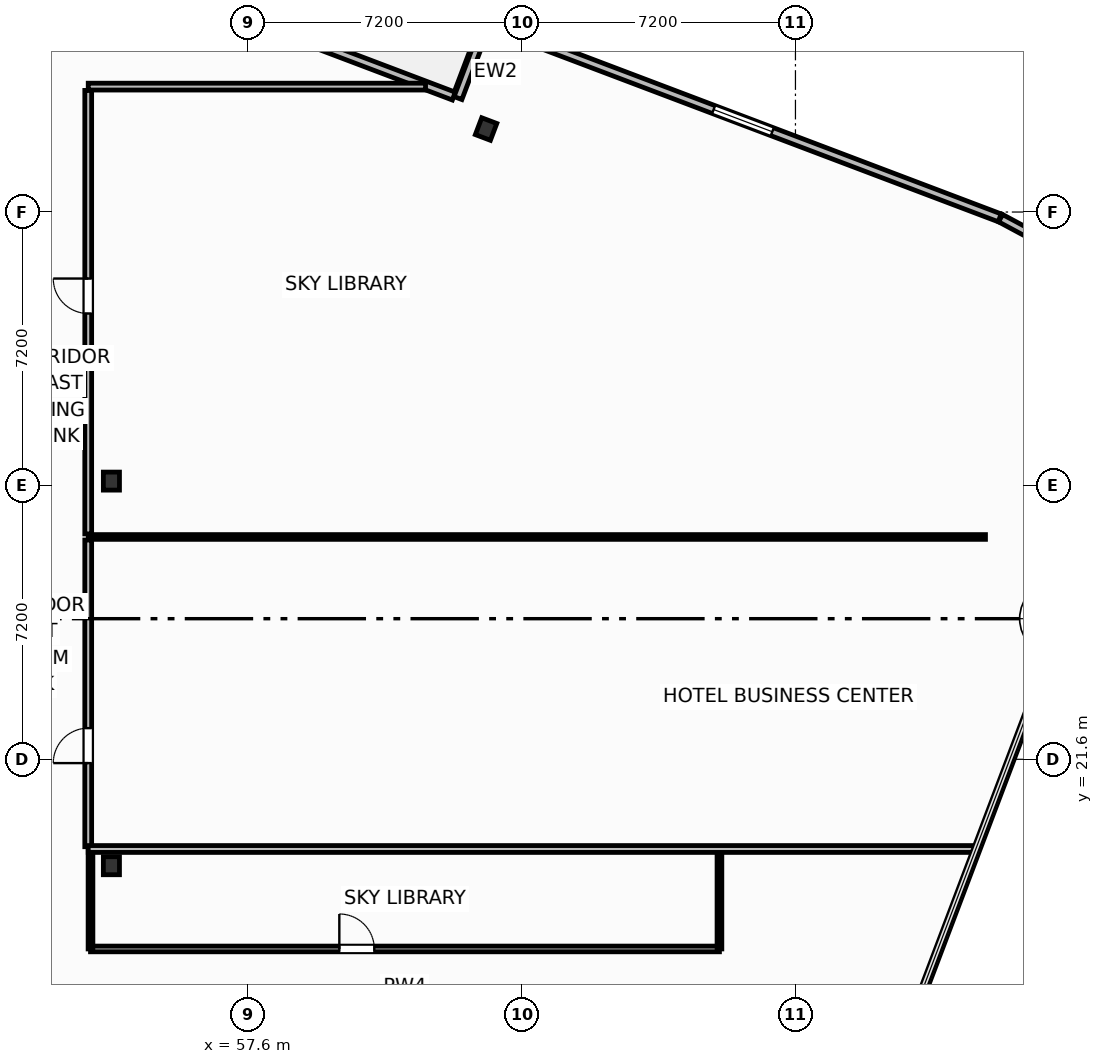
"""IFC4 building model, lengths in metres.
Left out: names, types, materials, properties, quantities, classifications, styles, units other than length and angle.
Written with IfcOpenShell. Run it as: python <this file> out.ifc"""

import sys

from ifc_helpers import new_model, si_unit, direction, frame, frame_2d, origin, origin_2d, place, context, subcontext, project, spatial, rectangle, i_section, extrude, element, fill, save


model = new_model("IFC4")
c1 = context("Model", 3, precision=1e-05, world=origin(), true_north=direction((0.0, 1.0)))
c2 = subcontext(c1, "Body", "Model", "MODEL_VIEW")
j1 = project(units=[si_unit("LENGTHUNIT", "METRE"), si_unit("PLANEANGLEUNIT", "RADIAN")], contexts=[c1])
p1 = place(None, origin())
s1 = spatial("IfcSite", under=j1, at=p1, CompositionType="ELEMENT")
p2 = place(p1, origin())
s2 = spatial("IfcBuilding", under=s1, at=p2, CompositionType="ELEMENT")
p3 = place(p2, frame((0.0, 0.0, 109.5)))
s3 = spatial("IfcBuildingStorey", under=s2, at=p3, CompositionType="ELEMENT", Elevation=109.5)
for number, where, z_axis, x_axis in (
    (1, (54.0, 18.8, 0.0), (0.0, 0.0, 1.0), (1.0, 0.0, 0.0)),
    (2, (54.0, 28.92, 0.0), (0.0, 0.0, 1.0), (1.0, 0.0, 0.0)),
    (3, (63.859, 38.184, 0.0), (0.0, 0.0, 1.0), (0.935, -0.354, 0.0)),
):
    element("IfcColumn", number, at=place(p3, frame(where, z_axis=z_axis, x_axis=x_axis)), inside=s3, PredefinedType="COLUMN", context=c2, shape_type="SweptSolid", body=[
        extrude(i_section(OverallWidth=0.424, OverallDepth=0.474, WebThickness=0.048, FlangeThickness=0.077, FilletRadius=0.025, at=origin_2d()), origin(), (0.0, 0.0, 1.0), 3.7),
    ])
p4 = place(p3, frame((57.399, 41.175, 0.0), z_axis=(0.0, 0.0, 1.0), x_axis=(0.935227640088, -0.354046976001, 0.0)))
e4 = element("IfcWall", 4, at=p4, inside=s3, PredefinedType="SOLIDWALL", context=c2, shape_type="SweptSolid", body=[
    extrude(rectangle(XDim=6.0, YDim=0.22, at=frame_2d((3.0, 0.0))), origin(), (0.0, 0.0, 1.0), 2.73),
])
p5 = place(p4, frame((0.4, 0.0, 0.0)))
e5 = element("IfcOpeningElement", 5, at=p5, cuts=e4, PredefinedType="OPENING", context=c2, shape_type="SweptSolid", body=[
    extrude(rectangle(XDim=1.5, YDim=2.25, at=frame_2d((0.75, 1.125))), frame((0.0, 0.12, 0.0), z_axis=(0.0, -1.0, 0.0), x_axis=(1.0, 0.0, 0.0)), (0.0, 0.0, 1.0), 0.24),
])
p6 = place(p3, frame((78.597, 35.194, 0.0), z_axis=(0.0, 0.0, 1.0), x_axis=(-0.880948732004, 0.473211719614, 0.0)))
e6 = element("IfcWall", 6, at=p6, inside=s3, PredefinedType="SOLIDWALL", context=c2, shape_type="SweptSolid", body=[
    extrude(rectangle(XDim=1.361, YDim=0.22, at=frame_2d((0.681, 0.0))), origin(), (0.0, 0.0, 1.0), 2.73),
])
p7 = place(p3, frame((77.375, 35.847, 0.0), z_axis=(0.0, 0.0, 1.0), x_axis=(-0.935222448475, 0.354060689526, 0.0)))
e7 = element("IfcWall", 7, at=p7, inside=s3, PredefinedType="SOLIDWALL", context=c2, shape_type="SweptSolid", body=[
    extrude(rectangle(XDim=14.447, YDim=0.22, at=frame_2d((7.224, 0.0))), origin(), (0.0, 0.0, 1.0), 2.73),
])
p8 = place(p7, frame((6.399, 0.0, 0.8)))
e8 = element("IfcOpeningElement", 8, at=p8, cuts=e7, PredefinedType="OPENING", context=c2, shape_type="SweptSolid", body=[
    extrude(rectangle(XDim=1.65, YDim=1.65, at=frame_2d((0.825, 0.825))), frame((0.0, 0.12, 0.0), z_axis=(0.0, -1.0, 0.0), x_axis=(1.0, 0.0, 0.0)), (0.0, 0.0, 1.0), 0.24),
])
p9 = place(p3, frame((63.819, 40.845, 0.0), z_axis=(0.0, 0.0, 1.0), x_axis=(-0.354128791944, -0.935196663123, 0.0)))
e9 = element("IfcWall", 9, at=p9, inside=s3, PredefinedType="SOLIDWALL", context=c2, shape_type="SweptSolid", body=[
    extrude(rectangle(XDim=1.975, YDim=0.22, at=frame_2d((0.988, 0.0))), origin(), (0.0, 0.0, 1.0), 2.73),
])
p10 = place(p3, frame((53.45, 16.61, 0.0), z_axis=(0.0, 0.0, 1.0), x_axis=(1.0, 0.0, 0.0)))
e10 = element("IfcWall", 10, at=p10, inside=s3, PredefinedType="PARTITIONING", context=c2, shape_type="SweptSolid", body=[
    extrude(rectangle(XDim=16.55, YDim=0.15, at=frame_2d((8.275, 0.0))), origin(), (0.0, 0.0, 1.0), 2.58),
])
p11 = place(p10, frame((6.548, 0.0, 0.0)))
e11 = element("IfcOpeningElement", 11, at=p11, cuts=e10, PredefinedType="OPENING", context=c2, shape_type="SweptSolid", body=[
    extrude(rectangle(XDim=0.92, YDim=2.05, at=frame_2d((0.46, 1.025))), frame((0.0, 0.085, 0.0), z_axis=(0.0, -1.0, 0.0), x_axis=(1.0, 0.0, 0.0)), (0.0, 0.0, 1.0), 0.17),
])
p12 = place(p3, frame((53.45, 16.61, 0.0), z_axis=(0.0, 0.0, 1.0), x_axis=(0.0, 1.0, 0.0)))
e12 = element("IfcWall", 12, at=p12, inside=s3, PredefinedType="PARTITIONING", context=c2, shape_type="SweptSolid", body=[
    extrude(rectangle(XDim=2.63, YDim=0.125, at=frame_2d((1.315, 0.0))), origin(), (0.0, 0.0, 1.0), 2.58),
])
p13 = place(p3, frame((70.0, 16.61, 0.0), z_axis=(0.0, 0.0, 1.0), x_axis=(0.0, 1.0, 0.0)))
e13 = element("IfcWall", 13, at=p13, inside=s3, PredefinedType="PARTITIONING", context=c2, shape_type="SweptSolid", body=[
    extrude(rectangle(XDim=2.63, YDim=0.125, at=frame_2d((1.315, 0.0))), origin(), (0.0, 0.0, 1.0), 2.824),
])
p14 = place(p3, frame((53.39, 19.3, 0.0), z_axis=(0.0, 0.0, 1.0), x_axis=(0.0, 1.0, 0.0)))
e14 = element("IfcWall", 14, at=p14, inside=s3, PredefinedType="PARTITIONING", context=c2, shape_type="SweptSolid", body=[
    extrude(rectangle(XDim=8.07, YDim=0.18, at=frame_2d((4.035, 0.0))), origin(), (0.0, 0.0, 1.0), 3.45),
])
p15 = place(p14, frame((2.2, 0.0, 0.0)))
e15 = element("IfcOpeningElement", 15, at=p15, cuts=e14, PredefinedType="OPENING", context=c2, shape_type="SweptSolid", body=[
    extrude(rectangle(XDim=0.92, YDim=2.05, at=frame_2d((0.46, 1.025))), frame((0.0, 0.1, 0.0), z_axis=(0.0, -1.0, 0.0), x_axis=(1.0, 0.0, 0.0)), (0.0, 0.0, 1.0), 0.2),
])
p16 = place(p3, frame((53.39, 27.53, 0.0), z_axis=(0.0, 0.0, 1.0), x_axis=(0.0, 1.0, 0.0)))
e16 = element("IfcWall", 16, at=p16, inside=s3, PredefinedType="PARTITIONING", context=c2, shape_type="SweptSolid", body=[
    extrude(rectangle(XDim=11.67, YDim=0.18, at=frame_2d((5.835, 0.0))), origin(), (0.0, 0.0, 1.0), 3.45),
])
p17 = place(p16, frame((5.8, 0.0, 0.0)))
e17 = element("IfcOpeningElement", 17, at=p17, cuts=e16, PredefinedType="OPENING", context=c2, shape_type="SweptSolid", body=[
    extrude(rectangle(XDim=0.92, YDim=2.05, at=frame_2d((0.46, 1.025))), frame((0.0, 0.1, 0.0), z_axis=(0.0, -1.0, 0.0), x_axis=(1.0, 0.0, 0.0)), (0.0, 0.0, 1.0), 0.2),
])
p18 = place(p3, frame((53.39, 27.45, 0.0), z_axis=(0.0, 0.0, 1.0), x_axis=(1.0, 0.0, 0.0)))
e18 = element("IfcWall", 18, at=p18, inside=s3, PredefinedType="PARTITIONING", context=c2, shape_type="SweptSolid", body=[
    extrude(rectangle(XDim=23.61, YDim=0.125, at=frame_2d((11.805, 0.0))), origin(), (0.0, 0.0, 1.0), 3.45),
])
p19 = place(p3, frame((53.39, 19.24, 0.0), z_axis=(0.0, 0.0, 1.0), x_axis=(1.0, 0.0, 0.0)))
e19 = element("IfcWall", 19, at=p19, inside=s3, PredefinedType="PARTITIONING", context=c2, shape_type="SweptSolid", body=[
    extrude(rectangle(XDim=23.317, YDim=0.18, at=frame_2d((11.658, 0.0))), origin(), (0.0, 0.0, 1.0), 3.45),
])
p20 = place(p3, frame((53.39, 39.3, 0.0), z_axis=(0.0, 0.0, 1.0), x_axis=(1.0, 0.0, 0.0)))
e20 = element("IfcWall", 20, at=p20, inside=s3, PredefinedType="PARTITIONING", context=c2, shape_type="SweptSolid", body=[
    extrude(rectangle(XDim=8.876, YDim=0.18, at=frame_2d((4.438, 0.0))), origin(), (0.0, 0.0, 1.0), 3.45),
])
p21 = place(p8, origin())
e21 = element("IfcWindow", 21, at=p21, inside=s3, PartitioningType="SINGLE_PANEL", PredefinedType="WINDOW", context=c2, shape_type="SweptSolid", body=[
    extrude(rectangle(XDim=1.65, YDim=1.65, at=frame_2d((0.825, 0.825))), frame((0.0, 0.03, 0.0), z_axis=(0.0, -1.0, 0.0), x_axis=(1.0, 0.0, 0.0)), (0.0, 0.0, 1.0), 0.06),
])
fill(e8, e21)
p22 = place(p11, origin())
e22 = element("IfcDoor", 22, at=p22, inside=s3, OperationType="SINGLE_SWING_LEFT", PredefinedType="DOOR", context=c2, shape_type="SweptSolid", body=[
    extrude(rectangle(XDim=0.92, YDim=2.05, at=frame_2d((0.46, 1.025))), frame((0.0, 0.025, 0.0), z_axis=(0.0, -1.0, 0.0), x_axis=(1.0, 0.0, 0.0)), (0.0, 0.0, 1.0), 0.05),
])
fill(e11, e22)
p23 = place(p15, origin())
e23 = element("IfcDoor", 23, at=p23, inside=s3, OperationType="SINGLE_SWING_LEFT", PredefinedType="DOOR", context=c2, shape_type="SweptSolid", body=[
    extrude(rectangle(XDim=0.92, YDim=2.05, at=frame_2d((0.46, 1.025))), frame((0.0, 0.025, 0.0), z_axis=(0.0, -1.0, 0.0), x_axis=(1.0, 0.0, 0.0)), (0.0, 0.0, 1.0), 0.05),
])
fill(e15, e23)
p24 = place(p17, origin())
e24 = element("IfcDoor", 24, at=p24, inside=s3, OperationType="SINGLE_SWING_RIGHT", PredefinedType="DOOR", context=c2, shape_type="SweptSolid", body=[
    extrude(rectangle(XDim=0.92, YDim=2.05, at=frame_2d((0.46, 1.025))), frame((0.0, 0.025, 0.0), z_axis=(0.0, -1.0, 0.0), x_axis=(1.0, 0.0, 0.0)), (0.0, 0.0, 1.0), 0.05),
])
fill(e17, e24)
save(model, sys.argv[1])
